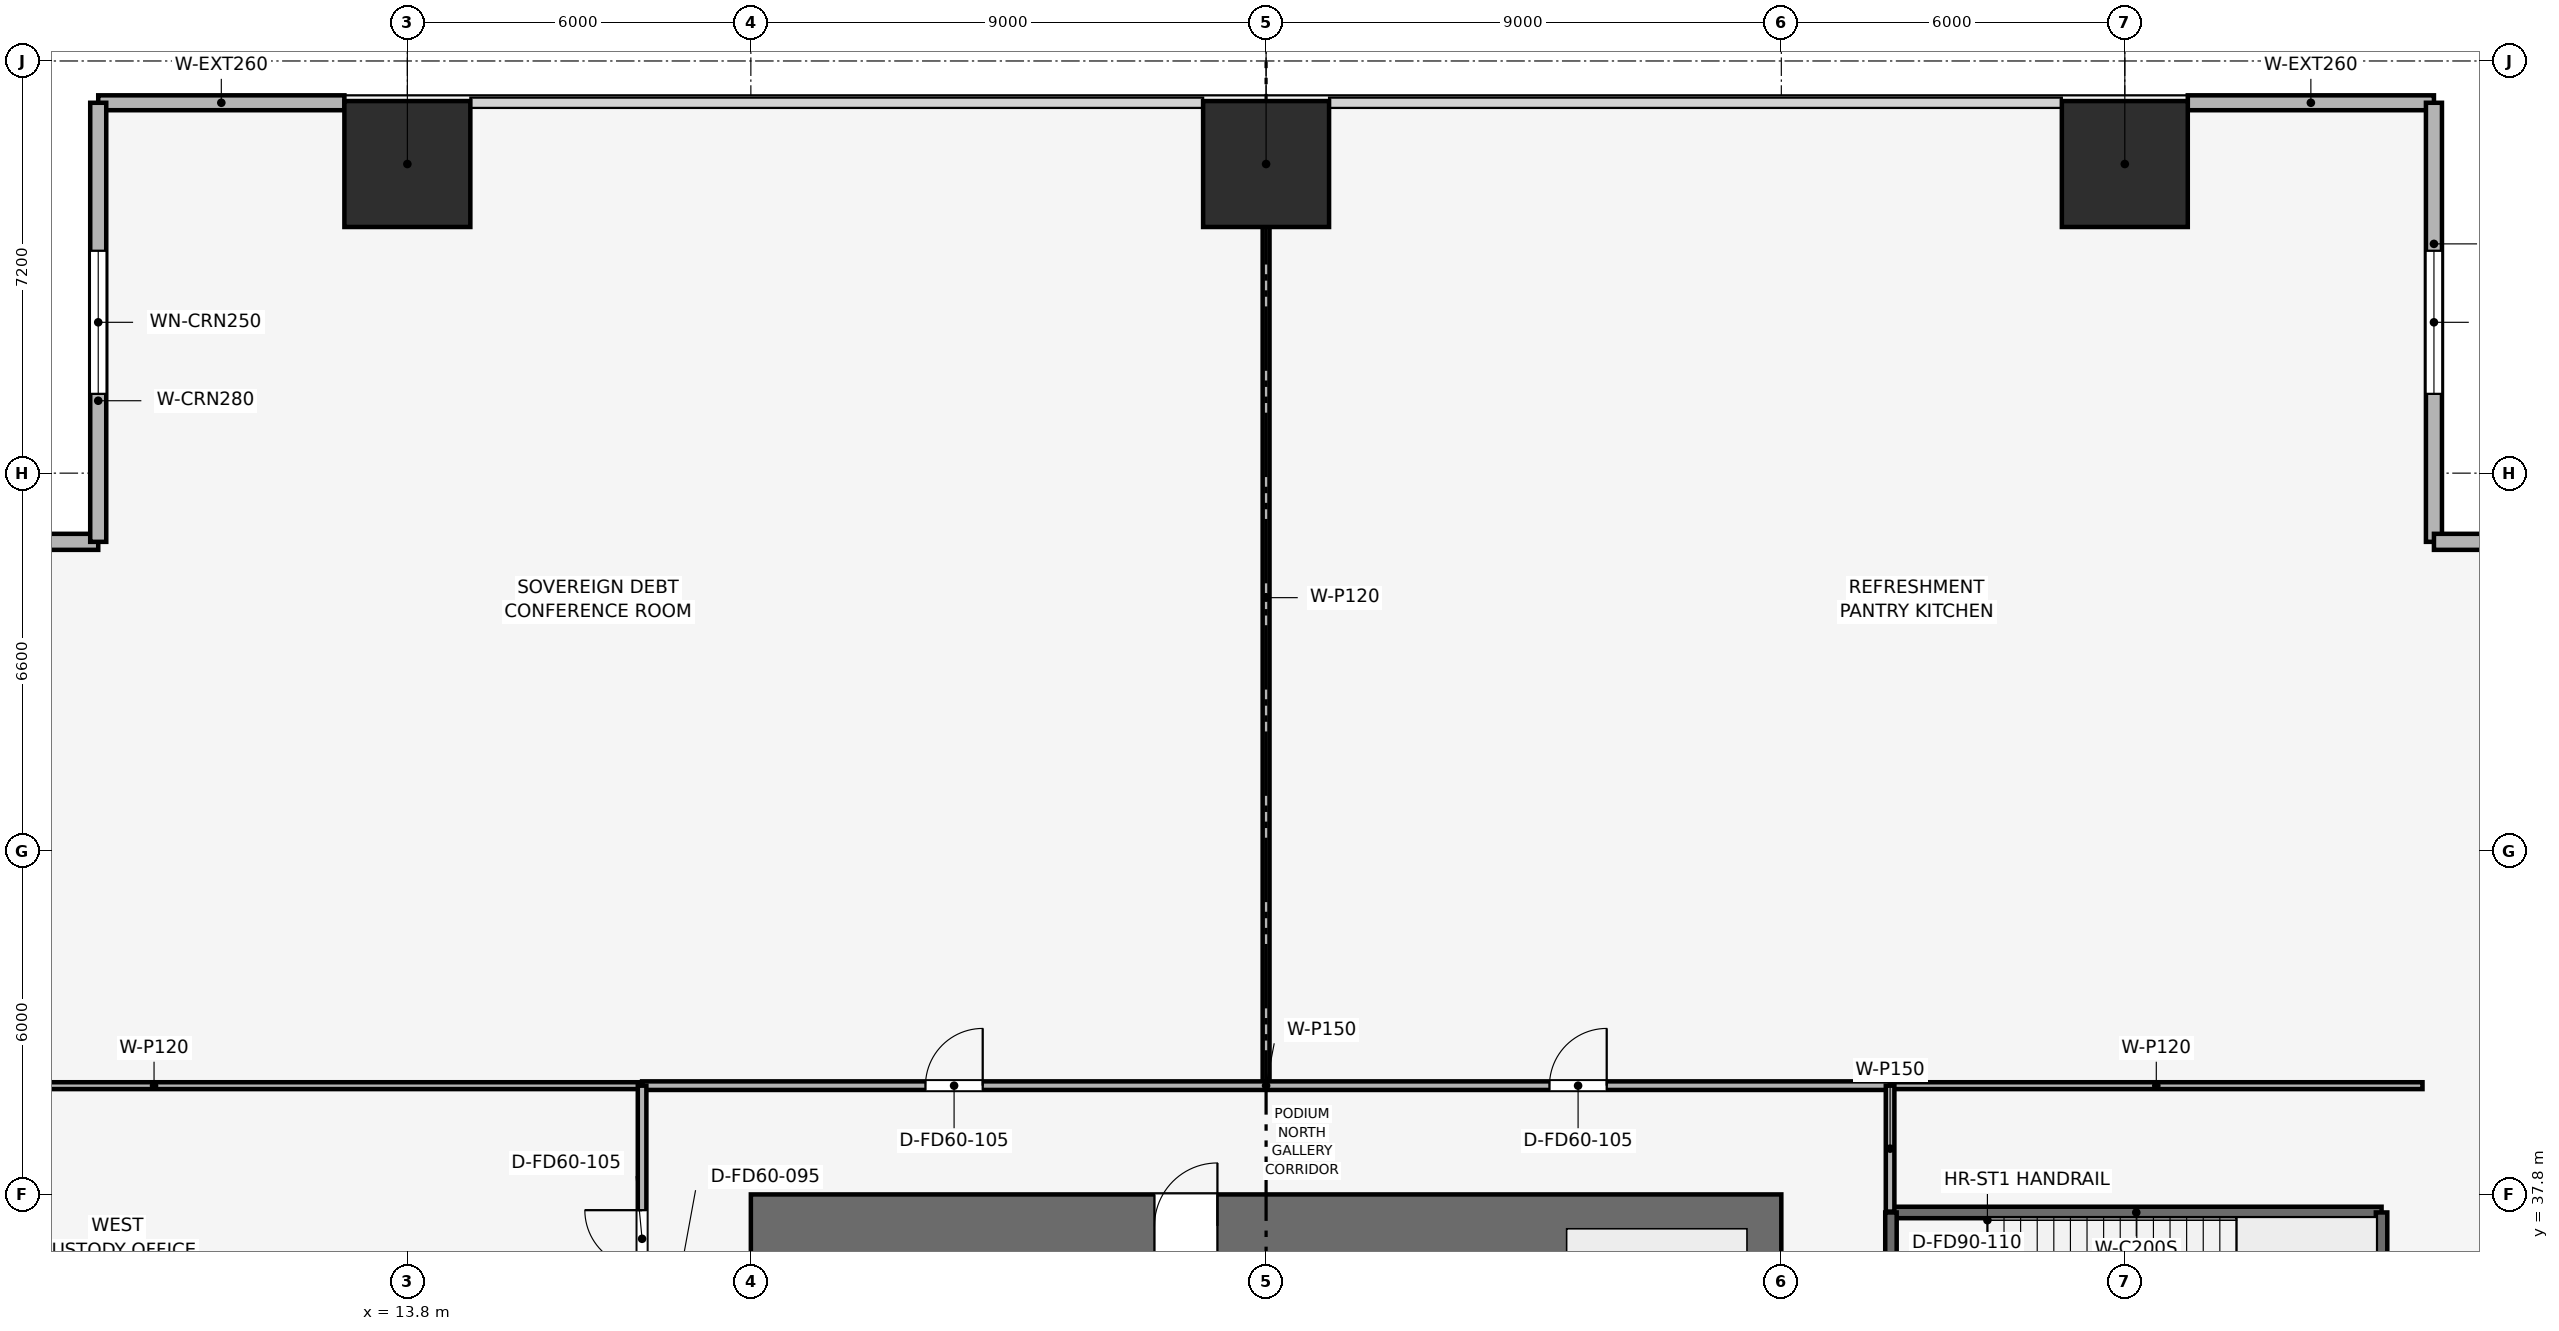
"""IFC4 building model, lengths in metres.
Left out: names, types, materials, properties, quantities, classifications, styles, units other than length and angle.
Written with IfcOpenShell. Run it as: python <this file> out.ifc"""

import sys

from ifc_helpers import new_model, si_unit, direction, frame, frame_2d, origin, origin_2d, place, context, subcontext, project, spatial, rectangle, extrude, element, fill, save


model = new_model("IFC4")
c1 = context("Model", 3, precision=1e-05, world=origin(), true_north=direction((0.0, 1.0)))
c2 = subcontext(c1, "Body", "Model", "MODEL_VIEW")
j1 = project(units=[si_unit("LENGTHUNIT", "METRE"), si_unit("PLANEANGLEUNIT", "RADIAN")], contexts=[c1])
p1 = place(None, origin())
s1 = spatial("IfcSite", under=j1, at=p1, CompositionType="ELEMENT")
p2 = place(p1, origin())
s2 = spatial("IfcBuilding", under=s1, at=p2, CompositionType="ELEMENT")
p3 = place(p2, frame((0.0, 0.0, 13.8)))
s3 = spatial("IfcBuildingStorey", under=s2, at=p3, CompositionType="ELEMENT", Elevation=13.8)
p4 = place(p3, frame((19.8, 37.25, 0.0), z_axis=(0.0, 0.0, 1.0), x_axis=(1.0, 0.0, 0.0)))
e1 = element("IfcWall", 1, at=p4, inside=s3, PredefinedType="SHEAR", context=c2, shape_type="SweptSolid", body=[
    extrude(rectangle(XDim=18.0, YDim=1.1, at=frame_2d((9.0, 0.0))), origin(), (0.0, 0.0, 1.0), 5.4),
])
p5 = place(p4, frame((7.05, 0.0, 0.0)))
e2 = element("IfcOpeningElement", 2, at=p5, cuts=e1, PredefinedType="OPENING", context=c2, shape_type="SweptSolid", body=[
    extrude(rectangle(XDim=1.1, YDim=2.15, at=frame_2d((0.55, 1.075))), frame((0.0, 0.56, 0.0), z_axis=(0.0, -1.0, 0.0), x_axis=(1.0, 0.0, 0.0)), (0.0, 0.0, 1.0), 1.12),
])
for number, where, z_axis, x_axis in (
    (3, (43.8, 55.8, 0.002), (0.0, 0.0, 1.0), (1.0, 0.0, 0.0)),
    (4, (28.8, 55.8, 0.002), (0.0, 0.0, 1.0), (1.0, 0.0, 0.0)),
    (5, (13.8, 55.8, 0.002), (0.0, 0.0, 1.0), (1.0, 0.0, 0.0)),
):
    element("IfcColumn", number, at=place(p3, frame(where, z_axis=z_axis, x_axis=x_axis)), inside=s3, PredefinedType="PILASTER", context=c2, shape_type="SweptSolid", body=[
        extrude(rectangle(XDim=2.2, YDim=2.2, at=origin_2d()), origin(), (0.0, 0.0, 1.0), 5.396),
    ])
for number, where, z_axis, x_axis in (
    (6, (8.4, 56.87, 0.0), (0.0, 0.0, 1.0), (1.0, 0.0, 0.0)),
    (7, (44.9, 56.87, 0.0), (0.0, 0.0, 1.0), (1.0, 0.0, 0.0)),
):
    element("IfcWall", number, at=place(p3, frame(where, z_axis=z_axis, x_axis=x_axis)), inside=s3, PredefinedType="SOLIDWALL", context=c2, shape_type="SweptSolid", body=[
        extrude(rectangle(XDim=4.3, YDim=0.26, at=frame_2d((2.15, 0.0))), origin(), (0.0, 0.0, 1.0), 5.05),
    ])
p6 = place(p3, frame((0.73, 49.2, 0.0), z_axis=(0.0, 0.0, 1.0), x_axis=(1.0, 0.0, 0.0)))
e8 = element("IfcWall", 8, at=p6, inside=s3, PredefinedType="SOLIDWALL", context=c2, shape_type="SweptSolid", body=[
    extrude(rectangle(XDim=7.67, YDim=0.28, at=frame_2d((3.835, 0.0))), origin(), (0.0, 0.0, 1.0), 5.05),
])
p7 = place(p6, frame((2.585, 0.0, 0.9)))
e9 = element("IfcOpeningElement", 9, at=p7, cuts=e8, PredefinedType="OPENING", context=c2, shape_type="SweptSolid", body=[
    extrude(rectangle(XDim=2.5, YDim=1.9, at=frame_2d((1.25, 0.95))), frame((0.0, 0.15, 0.0), z_axis=(0.0, -1.0, 0.0), x_axis=(1.0, 0.0, 0.0)), (0.0, 0.0, 1.0), 0.3),
])
p8 = place(p3, frame((8.4, 49.2, 0.0), z_axis=(0.0, 0.0, 1.0), x_axis=(0.0, 1.0, 0.0)))
e10 = element("IfcWall", 10, at=p8, inside=s3, PredefinedType="SOLIDWALL", context=c2, shape_type="SweptSolid", body=[
    extrude(rectangle(XDim=7.67, YDim=0.28, at=frame_2d((3.835, 0.0))), origin(), (0.0, 0.0, 1.0), 5.05),
])
p9 = place(p8, frame((2.585, 0.0, 0.9)))
e11 = element("IfcOpeningElement", 11, at=p9, cuts=e10, PredefinedType="OPENING", context=c2, shape_type="SweptSolid", body=[
    extrude(rectangle(XDim=2.5, YDim=1.9, at=frame_2d((1.25, 0.95))), frame((0.0, 0.15, 0.0), z_axis=(0.0, -1.0, 0.0), x_axis=(1.0, 0.0, 0.0)), (0.0, 0.0, 1.0), 0.3),
])
p10 = place(p3, frame((49.2, 56.87, 0.0), z_axis=(0.0, 0.0, 1.0), x_axis=(0.0, -1.0, 0.0)))
e12 = element("IfcWall", 12, at=p10, inside=s3, PredefinedType="SOLIDWALL", context=c2, shape_type="SweptSolid", body=[
    extrude(rectangle(XDim=7.67, YDim=0.28, at=frame_2d((3.835, 0.0))), origin(), (0.0, 0.0, 1.0), 5.05),
])
p11 = place(p10, frame((2.585, 0.0, 0.9)))
e13 = element("IfcOpeningElement", 13, at=p11, cuts=e12, PredefinedType="OPENING", context=c2, shape_type="SweptSolid", body=[
    extrude(rectangle(XDim=2.5, YDim=1.9, at=frame_2d((1.25, 0.95))), frame((0.0, 0.15, 0.0), z_axis=(0.0, -1.0, 0.0), x_axis=(1.0, 0.0, 0.0)), (0.0, 0.0, 1.0), 0.3),
])
p12 = place(p3, frame((49.2, 49.2, 0.0), z_axis=(0.0, 0.0, 1.0), x_axis=(1.0, 0.0, 0.0)))
e14 = element("IfcWall", 14, at=p12, inside=s3, PredefinedType="SOLIDWALL", context=c2, shape_type="SweptSolid", body=[
    extrude(rectangle(XDim=7.67, YDim=0.28, at=frame_2d((3.835, 0.0))), origin(), (0.0, 0.0, 1.0), 5.05),
])
p13 = place(p12, frame((2.585, 0.0, 0.9)))
e15 = element("IfcOpeningElement", 15, at=p13, cuts=e14, PredefinedType="OPENING", context=c2, shape_type="SweptSolid", body=[
    extrude(rectangle(XDim=2.5, YDim=1.9, at=frame_2d((1.25, 0.95))), frame((0.0, 0.15, 0.0), z_axis=(0.0, -1.0, 0.0), x_axis=(1.0, 0.0, 0.0)), (0.0, 0.0, 1.0), 0.3),
])
p14 = place(p3, frame((39.715, 37.485, 0.0), z_axis=(0.0, 0.0, 1.0), x_axis=(1.0, 0.0, 0.0)))
e16 = element("IfcWall", 16, at=p14, inside=s3, PredefinedType="SHEAR", context=c2, shape_type="SweptSolid", body=[
    extrude(rectangle(XDim=8.57, YDim=0.2, at=frame_2d((4.285, 0.0))), origin(), (0.0, 0.0, 1.0), 5.398),
])
p15 = place(p3, frame((48.285, 34.165, 0.0), z_axis=(0.0, 0.0, 1.0), x_axis=(0.0, 1.0, 0.0)))
e17 = element("IfcWall", 17, at=p15, inside=s3, PredefinedType="SHEAR", context=c2, shape_type="SweptSolid", body=[
    extrude(rectangle(XDim=3.32, YDim=0.2, at=frame_2d((1.66, 0.0))), origin(), (0.0, 0.0, 1.0), 5.398),
])
p16 = place(p3, frame((39.715, 34.165, 0.0), z_axis=(0.0, 0.0, 1.0), x_axis=(0.0, 1.0, 0.0)))
e18 = element("IfcWall", 18, at=p16, inside=s3, PredefinedType="SHEAR", context=c2, shape_type="SweptSolid", body=[
    extrude(rectangle(XDim=3.32, YDim=0.2, at=frame_2d((1.66, 0.0))), origin(), (0.0, 0.0, 1.0), 5.398),
])
p17 = place(p16, frame((0.9, 0.0, 0.0)))
e19 = element("IfcOpeningElement", 19, at=p17, cuts=e18, PredefinedType="OPENING", context=c2, shape_type="SweptSolid", body=[
    extrude(rectangle(XDim=1.1, YDim=2.15, at=frame_2d((0.55, 1.075))), frame((0.0, 0.11, 0.0), z_axis=(0.0, -1.0, 0.0), x_axis=(1.0, 0.0, 0.0)), (0.0, 0.0, 1.0), 0.22),
])
p18 = place(p3, frame((28.8, 39.7, 0.0), z_axis=(0.0, 0.0, 1.0), x_axis=(0.0, 1.0, 0.0)))
e20 = element("IfcWall", 20, at=p18, inside=s3, PredefinedType="PARTITIONING", context=c2, shape_type="SweptSolid", body=[
    extrude(rectangle(XDim=17.05, YDim=0.12, at=frame_2d((8.525, 0.0))), origin(), (0.0, 0.0, 1.0), 4.035),
])
p19 = place(p3, frame((0.85, 39.7, 0.0), z_axis=(0.0, 0.0, 1.0), x_axis=(1.0, 0.0, 0.0)))
e21 = element("IfcWall", 21, at=p19, inside=s3, PredefinedType="PARTITIONING", context=c2, shape_type="SweptSolid", body=[
    extrude(rectangle(XDim=17.05, YDim=0.12, at=frame_2d((8.525, 0.0))), origin(), (0.0, 0.0, 1.0), 4.035),
])
p20 = place(p3, frame((39.7, 39.7, 0.0), z_axis=(0.0, 0.0, 1.0), x_axis=(1.0, 0.0, 0.0)))
e22 = element("IfcWall", 22, at=p20, inside=s3, PredefinedType="PARTITIONING", context=c2, shape_type="SweptSolid", body=[
    extrude(rectangle(XDim=9.3, YDim=0.12, at=frame_2d((4.65, 0.0))), origin(), (0.0, 0.0, 1.0), 5.05),
])
p21 = place(p3, frame((17.9, 39.7, 0.0), z_axis=(0.0, 0.0, 1.0), x_axis=(1.0, 0.0, 0.0)))
e23 = element("IfcWall", 23, at=p21, inside=s3, PredefinedType="PARTITIONING", context=c2, shape_type="SweptSolid", body=[
    extrude(rectangle(XDim=21.8, YDim=0.15, at=frame_2d((10.9, 0.0))), origin(), (0.0, 0.0, 1.0), 4.135),
])
p22 = place(p21, frame((4.95, 0.0, 0.0)))
e24 = element("IfcOpeningElement", 24, at=p22, cuts=e23, PredefinedType="OPENING", context=c2, shape_type="SweptSolid", body=[
    extrude(rectangle(XDim=1.0, YDim=2.15, at=frame_2d((0.5, 1.075))), frame((0.0, 0.085, 0.0), z_axis=(0.0, -1.0, 0.0), x_axis=(1.0, 0.0, 0.0)), (0.0, 0.0, 1.0), 0.17),
])
p23 = place(p21, frame((15.85, 0.0, 0.0)))
e25 = element("IfcOpeningElement", 25, at=p23, cuts=e23, PredefinedType="OPENING", context=c2, shape_type="SweptSolid", body=[
    extrude(rectangle(XDim=1.0, YDim=2.15, at=frame_2d((0.5, 1.075))), frame((0.0, 0.085, 0.0), z_axis=(0.0, -1.0, 0.0), x_axis=(1.0, 0.0, 0.0)), (0.0, 0.0, 1.0), 0.17),
])
p24 = place(p3, frame((17.9, 23.45, 0.0), z_axis=(0.0, 0.0, 1.0), x_axis=(0.0, 1.0, 0.0)))
e26 = element("IfcWall", 26, at=p24, inside=s3, PredefinedType="PARTITIONING", context=c2, shape_type="SweptSolid", body=[
    extrude(rectangle(XDim=16.25, YDim=0.15, at=frame_2d((8.125, 0.0))), origin(), (0.0, 0.0, 1.0), 4.135),
])
p25 = place(p24, frame((1.9, 0.0, 0.0)))
e27 = element("IfcOpeningElement", 27, at=p25, cuts=e26, PredefinedType="OPENING", context=c2, shape_type="SweptSolid", body=[
    extrude(rectangle(XDim=0.9, YDim=2.1, at=frame_2d((0.45, 1.05))), frame((0.0, 0.085, 0.0), z_axis=(0.0, -1.0, 0.0), x_axis=(1.0, 0.0, 0.0)), (0.0, 0.0, 1.0), 0.17),
])
p26 = place(p24, frame((5.6, 0.0, 0.0)))
e28 = element("IfcOpeningElement", 28, at=p26, cuts=e26, PredefinedType="OPENING", context=c2, shape_type="SweptSolid", body=[
    extrude(rectangle(XDim=0.9, YDim=2.1, at=frame_2d((0.45, 1.05))), frame((0.0, 0.085, 0.0), z_axis=(0.0, -1.0, 0.0), x_axis=(1.0, 0.0, 0.0)), (0.0, 0.0, 1.0), 0.17),
])
p27 = place(p24, frame((8.85, 0.0, 0.0)))
e29 = element("IfcOpeningElement", 29, at=p27, cuts=e26, PredefinedType="OPENING", context=c2, shape_type="SweptSolid", body=[
    extrude(rectangle(XDim=0.95, YDim=2.1, at=frame_2d((0.475, 1.05))), frame((0.0, 0.085, 0.0), z_axis=(0.0, -1.0, 0.0), x_axis=(1.0, 0.0, 0.0)), (0.0, 0.0, 1.0), 0.17),
])
p28 = place(p24, frame((13.075, 0.0, 0.0)))
e30 = element("IfcOpeningElement", 30, at=p28, cuts=e26, PredefinedType="OPENING", context=c2, shape_type="SweptSolid", body=[
    extrude(rectangle(XDim=1.0, YDim=2.15, at=frame_2d((0.5, 1.075))), frame((0.0, 0.085, 0.0), z_axis=(0.0, -1.0, 0.0), x_axis=(1.0, 0.0, 0.0)), (0.0, 0.0, 1.0), 0.17),
])
p29 = place(p3, frame((39.7, 37.5, 0.0), z_axis=(0.0, 0.0, 1.0), x_axis=(0.0, 1.0, 0.0)))
e31 = element("IfcWall", 31, at=p29, inside=s3, PredefinedType="PARTITIONING", context=c2, shape_type="SweptSolid", body=[
    extrude(rectangle(XDim=2.2, YDim=0.15, at=frame_2d((1.1, 0.0))), origin(), (0.0, 0.0, 1.0), 5.05),
])
p30 = place(p9, origin())
e32 = element("IfcWindow", 32, at=p30, inside=s3, PartitioningType="SINGLE_PANEL", PredefinedType="WINDOW", context=c2, shape_type="SweptSolid", body=[
    extrude(rectangle(XDim=2.5, YDim=1.9, at=frame_2d((1.25, 0.95))), frame((0.0, 0.03, 0.0), z_axis=(0.0, -1.0, 0.0), x_axis=(1.0, 0.0, 0.0)), (0.0, 0.0, 1.0), 0.06),
])
fill(e11, e32)
p31 = place(p11, origin())
e33 = element("IfcWindow", 33, at=p31, inside=s3, PartitioningType="SINGLE_PANEL", PredefinedType="WINDOW", context=c2, shape_type="SweptSolid", body=[
    extrude(rectangle(XDim=2.5, YDim=1.9, at=frame_2d((1.25, 0.95))), frame((0.0, 0.03, 0.0), z_axis=(0.0, -1.0, 0.0), x_axis=(1.0, 0.0, 0.0)), (0.0, 0.0, 1.0), 0.06),
])
fill(e13, e33)
p32 = place(p22, origin())
e34 = element("IfcDoor", 34, at=p32, inside=s3, OperationType="SINGLE_SWING_RIGHT", PredefinedType="DOOR", context=c2, shape_type="SweptSolid", body=[
    extrude(rectangle(XDim=1.0, YDim=2.15, at=frame_2d((0.5, 1.075))), frame((0.0, 0.025, 0.0), z_axis=(0.0, -1.0, 0.0), x_axis=(1.0, 0.0, 0.0)), (0.0, 0.0, 1.0), 0.05),
])
fill(e24, e34)
p33 = place(p23, origin())
e35 = element("IfcDoor", 35, at=p33, inside=s3, OperationType="SINGLE_SWING_RIGHT", PredefinedType="DOOR", context=c2, shape_type="SweptSolid", body=[
    extrude(rectangle(XDim=1.0, YDim=2.15, at=frame_2d((0.5, 1.075))), frame((0.0, 0.025, 0.0), z_axis=(0.0, -1.0, 0.0), x_axis=(1.0, 0.0, 0.0)), (0.0, 0.0, 1.0), 0.05),
])
fill(e25, e35)
p34 = place(p28, origin())
e36 = element("IfcDoor", 36, at=p34, inside=s3, OperationType="SINGLE_SWING_RIGHT", PredefinedType="DOOR", context=c2, shape_type="SweptSolid", body=[
    extrude(rectangle(XDim=1.0, YDim=2.15, at=frame_2d((0.5, 1.075))), frame((0.0, 0.025, 0.0), z_axis=(0.0, -1.0, 0.0), x_axis=(1.0, 0.0, 0.0)), (0.0, 0.0, 1.0), 0.05),
])
fill(e30, e36)
p35 = place(p5, origin())
e37 = element("IfcDoor", 37, at=p35, inside=s3, OperationType="SINGLE_SWING_RIGHT", PredefinedType="DOOR", context=c2, shape_type="SweptSolid", body=[
    extrude(rectangle(XDim=1.1, YDim=2.15, at=frame_2d((0.55, 1.075))), frame((0.0, 0.025, 0.0), z_axis=(0.0, -1.0, 0.0), x_axis=(1.0, 0.0, 0.0)), (0.0, 0.0, 1.0), 0.05),
])
fill(e2, e37)
save(model, sys.argv[1])
